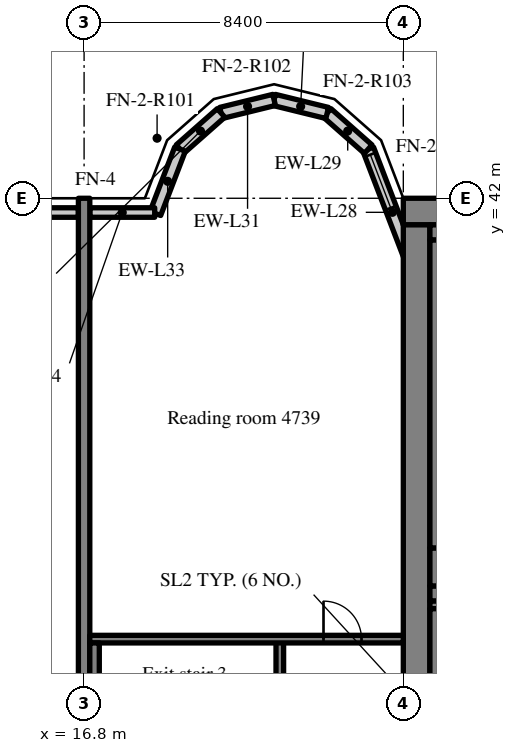
"""IFC4 building model, lengths in metres.
Left out: names, types, materials, properties, quantities, classifications, styles, units other than length and angle.
Written with IfcOpenShell. Run it as: python <this file> out.ifc"""

import sys

from ifc_helpers import new_model, si_unit, direction, frame, frame_2d, origin, place, context, subcontext, project, spatial, rectangle, extrude, source, transform, mapped, element, fill, save


model = new_model("IFC4")
c1 = context("Model", 3, precision=1e-05, world=origin(), true_north=direction((0.0, 1.0)))
c2 = subcontext(c1, "Body", "Model", "MODEL_VIEW")
j1 = project(units=[si_unit("LENGTHUNIT", "METRE"), si_unit("PLANEANGLEUNIT", "RADIAN")], contexts=[c1])
p1 = place(None, origin())
s1 = spatial("IfcSite", under=j1, at=p1, CompositionType="ELEMENT")
p2 = place(p1, origin())
s2 = spatial("IfcBuilding", under=s1, at=p2, CompositionType="ELEMENT")
p3 = place(p2, frame((0.0, 0.0, 193.4)))
s3 = spatial("IfcBuildingStorey", under=s2, at=p3, CompositionType="ELEMENT", Elevation=193.4)
m1 = source(origin(), c2, "Body", "SweptSolid", [
    extrude(rectangle(XDim=50.4, YDim=0.7, at=frame_2d((25.2, 0.0))), origin(), (0.0, 0.0, 1.0), 3.52),
])
p4 = place(p3, frame((25.2, 41.65, 0.0), z_axis=(0.0, 0.0, 1.0), x_axis=(1.0, 0.0, 0.0)))
e1 = element("IfcWall", 1, at=p4, inside=s3, PredefinedType="SHEAR", context=c2, shape_type="MappedRepresentation", body=[
    mapped(m1, transform((0.0, 0.0, 0.0), scale=1.0)),
])
m2 = source(origin(), c2, "Body", "SweptSolid", [
    extrude(rectangle(XDim=18.6, YDim=0.7, at=frame_2d((9.3, 0.0))), origin(), (0.0, 0.0, 1.0), 3.52),
])
p5 = place(p3, frame((25.55, 22.7, 0.0), z_axis=(0.0, 0.0, 1.0), x_axis=(0.0, 1.0, 0.0)))
e2 = element("IfcWall", 2, at=p5, inside=s3, PredefinedType="SHEAR", context=c2, shape_type="MappedRepresentation", body=[
    mapped(m2, transform((0.0, 0.0, 0.0), scale=1.0)),
])
m3 = source(origin(), c2, "Body", "SweptSolid", [
    extrude(rectangle(XDim=7.5, YDim=0.4, at=frame_2d((3.75, 0.0))), origin(), (0.0, 0.0, 1.0), 3.52),
])
p6 = place(p3, frame((25.9, 31.6, 0.0), z_axis=(0.0, 0.0, 1.0), x_axis=(1.0, 0.0, 0.0)))
e3 = element("IfcWall", 3, at=p6, inside=s3, PredefinedType="SHEAR", context=c2, shape_type="MappedRepresentation", body=[
    mapped(m3, transform((0.0, 0.0, 0.0), scale=1.0)),
])
m4 = source(origin(), c2, "Body", "SweptSolid", [
    extrude(rectangle(XDim=1.1, YDim=2.1, at=frame_2d((0.55, 1.05))), frame((0.0, 0.21, 0.0), z_axis=(0.0, -1.0, 0.0), x_axis=(1.0, 0.0, 0.0)), (0.0, 0.0, 1.0), 0.42),
])
p7 = place(p6, frame((5.825, 0.0, 0.0)))
e4 = element("IfcOpeningElement", 4, at=p7, cuts=e3, PredefinedType="OPENING", context=c2, shape_type="MappedRepresentation", body=[
    mapped(m4, transform((0.0, 0.0, 0.0), scale=1.0)),
])
m5 = source(origin(), c2, "Body", "SweptSolid", [
    extrude(rectangle(XDim=20.0, YDim=0.3, at=frame_2d((10.0, 0.0))), origin(), (0.0, 0.0, 1.0), 3.52),
])
p8 = place(p3, frame((16.8, 22.0, 0.0), z_axis=(0.0, 0.0, 1.0), x_axis=(0.0, 1.0, 0.0)))
e5 = element("IfcWall", 5, at=p8, inside=s3, PredefinedType="SHEAR", context=c2, shape_type="MappedRepresentation", body=[
    mapped(m5, transform((0.0, 0.0, 0.0), scale=1.0)),
])
m6 = source(origin(), c2, "Body", "SweptSolid", [
    extrude(rectangle(XDim=3.559, YDim=0.3, at=frame_2d((1.78, 0.0))), origin(), (0.0, 0.0, 1.0), 3.52),
])
p9 = place(p3, frame((25.55, 39.969, 0.0), z_axis=(0.0, 0.0, 1.0), x_axis=(-0.35779745313, 0.933799219604, 0.0)))
e6 = element("IfcWall", 6, at=p9, inside=s3, PredefinedType="SOLIDWALL", context=c2, shape_type="MappedRepresentation", body=[
    mapped(m6, transform((0.0, 0.0, 0.0), scale=1.0)),
])
m7 = source(origin(), c2, "Body", "SweptSolid", [
    extrude(rectangle(XDim=1.5, YDim=2.0, at=frame_2d((0.75, 1.0))), frame((0.0, 0.16, 0.0), z_axis=(0.0, -1.0, 0.0), x_axis=(1.0, 0.0, 0.0)), (0.0, 0.0, 1.0), 0.32),
])
p10 = place(p9, frame((1.903, 0.0, 0.9)))
e7 = element("IfcOpeningElement", 7, at=p10, cuts=e6, PredefinedType="OPENING", context=c2, shape_type="MappedRepresentation", body=[
    mapped(m7, transform((0.0, 0.0, 0.0), scale=1.0)),
])
m8 = source(origin(), c2, "Body", "SweptSolid", [
    extrude(rectangle(XDim=1.44, YDim=0.3, at=frame_2d((0.72, 0.0))), origin(), (0.0, 0.0, 1.0), 3.52),
])
p11 = place(p3, frame((24.277, 43.292, 0.0), z_axis=(0.0, 0.0, 1.0), x_axis=(-0.749649827867, 0.661834673902, 0.0)))
e8 = element("IfcWall", 8, at=p11, inside=s3, PredefinedType="SOLIDWALL", context=c2, shape_type="MappedRepresentation", body=[
    mapped(m8, transform((0.0, 0.0, 0.0), scale=1.0)),
])
m9 = source(origin(), c2, "Body", "SweptSolid", [
    extrude(rectangle(XDim=1.438, YDim=0.3, at=frame_2d((0.719, 0.0))), origin(), (0.0, 0.0, 1.0), 3.52),
])
p12 = place(p3, frame((23.197, 44.245, 0.0), z_axis=(0.0, 0.0, 1.0), x_axis=(-0.971152283879, 0.238460146601, 0.0)))
e9 = element("IfcWall", 9, at=p12, inside=s3, PredefinedType="SOLIDWALL", context=c2, shape_type="MappedRepresentation", body=[
    mapped(m9, transform((0.0, 0.0, 0.0), scale=1.0)),
])
m10 = source(origin(), c2, "Body", "SweptSolid", [
    extrude(rectangle(XDim=1.439, YDim=0.3, at=frame_2d((0.719, 0.0))), origin(), (0.0, 0.0, 1.0), 3.52),
])
p13 = place(p3, frame((21.8, 44.588, 0.0), z_axis=(0.0, 0.0, 1.0), x_axis=(-0.971161932466, -0.238420848351, 0.0)))
e10 = element("IfcWall", 10, at=p13, inside=s3, PredefinedType="SOLIDWALL", context=c2, shape_type="MappedRepresentation", body=[
    mapped(m10, transform((0.0, 0.0, 0.0), scale=1.0)),
])
m11 = source(origin(), c2, "Body", "SweptSolid", [
    extrude(rectangle(XDim=1.44, YDim=0.3, at=frame_2d((0.72, 0.0))), origin(), (0.0, 0.0, 1.0), 3.52),
])
p14 = place(p3, frame((20.403, 44.245, 0.0), z_axis=(0.0, 0.0, 1.0), x_axis=(-0.74957555648, -0.661918790432, 0.0)))
e11 = element("IfcWall", 11, at=p14, inside=s3, PredefinedType="SOLIDWALL", context=c2, shape_type="MappedRepresentation", body=[
    mapped(m11, transform((0.0, 0.0, 0.0), scale=1.0)),
])
m12 = source(origin(), c2, "Body", "SweptSolid", [
    extrude(rectangle(XDim=1.812, YDim=0.3, at=frame_2d((0.906, 0.0))), origin(), (0.0, 0.0, 1.0), 3.52),
])
p15 = place(p3, frame((19.323, 43.292, 0.0), z_axis=(0.0, 0.0, 1.0), x_axis=(-0.357877270961, -0.93376863244, 0.0)))
e12 = element("IfcWall", 12, at=p15, inside=s3, PredefinedType="SOLIDWALL", context=c2, shape_type="MappedRepresentation", body=[
    mapped(m12, transform((0.0, 0.0, 0.0), scale=1.0)),
])
m13 = source(origin(), c2, "Body", "SweptSolid", [
    extrude(rectangle(XDim=4.094, YDim=0.25, at=frame_2d((2.047, 0.0))), origin(), (0.0, 0.0, 1.0), 2.87),
])
p16 = place(p3, frame((16.65, 41.625, 0.0), z_axis=(0.0, 0.0, 1.0), x_axis=(-1.0, 0.0, 0.0)))
e13 = element("IfcWall", 13, at=p16, inside=s3, PredefinedType="SOLIDWALL", context=c2, shape_type="MappedRepresentation", body=[
    mapped(m13, transform((0.0, 0.0, 0.0), scale=1.0)),
])
m14 = source(origin(), c2, "Body", "SweptSolid", [
    extrude(rectangle(XDim=1.5, YDim=1.5, at=frame_2d((0.75, 0.75))), frame((0.0, 0.135, 0.0), z_axis=(0.0, -1.0, 0.0), x_axis=(1.0, 0.0, 0.0)), (0.0, 0.0, 1.0), 0.27),
])
p17 = place(p16, frame((1.297, 0.0, 0.9)))
e14 = element("IfcOpeningElement", 14, at=p17, cuts=e13, PredefinedType="OPENING", context=c2, shape_type="MappedRepresentation", body=[
    mapped(m14, transform((0.0, 0.0, 0.0), scale=1.0)),
])
m15 = source(origin(), c2, "Body", "SweptSolid", [
    extrude(rectangle(XDim=1.708, YDim=0.25, at=frame_2d((0.854, 0.0))), origin(), (0.0, 0.0, 1.0), 2.87),
])
p18 = place(p3, frame((18.658, 41.625, 0.0), z_axis=(0.0, 0.0, 1.0), x_axis=(-1.0, 0.0, 0.0)))
e15 = element("IfcWall", 15, at=p18, inside=s3, PredefinedType="SOLIDWALL", context=c2, shape_type="MappedRepresentation", body=[
    mapped(m15, transform((0.0, 0.0, 0.0), scale=1.0)),
])
m16 = source(origin(), c2, "Body", "SweptSolid", [
    extrude(rectangle(XDim=8.3, YDim=0.2, at=frame_2d((4.15, 0.0))), origin(), (0.0, 0.0, 1.0), 3.52),
])
p19 = place(p3, frame((21.95, 22.1, 0.0), z_axis=(0.0, 0.0, 1.0), x_axis=(0.0, 1.0, 0.0)))
e16 = element("IfcWall", 16, at=p19, inside=s3, PredefinedType="SOLIDWALL", context=c2, shape_type="MappedRepresentation", body=[
    mapped(m16, transform((0.0, 0.0, 0.0), scale=1.0)),
])
m17 = source(origin(), c2, "Body", "SweptSolid", [
    extrude(rectangle(XDim=1.2, YDim=2.1, at=frame_2d((0.6, 1.05))), frame((0.0, 0.11, 0.0), z_axis=(0.0, -1.0, 0.0), x_axis=(1.0, 0.0, 0.0)), (0.0, 0.0, 1.0), 0.22),
])
p20 = place(p19, frame((0.6, 0.0, 0.0)))
e17 = element("IfcOpeningElement", 17, at=p20, cuts=e16, PredefinedType="OPENING", context=c2, shape_type="MappedRepresentation", body=[
    mapped(m17, transform((0.0, 0.0, 0.0), scale=1.0)),
])
m18 = source(origin(), c2, "Body", "SweptSolid", [
    extrude(rectangle(XDim=8.25, YDim=0.2, at=frame_2d((4.125, 0.0))), origin(), (0.0, 0.0, 1.0), 3.52),
])
p21 = place(p3, frame((16.95, 30.4, 0.0), z_axis=(0.0, 0.0, 1.0), x_axis=(1.0, 0.0, 0.0)))
e18 = element("IfcWall", 18, at=p21, inside=s3, PredefinedType="SOLIDWALL", context=c2, shape_type="MappedRepresentation", body=[
    mapped(m18, transform((0.0, 0.0, 0.0), scale=1.0)),
])
m19 = source(origin(), c2, "Body", "SweptSolid", [
    extrude(rectangle(XDim=1.0, YDim=2.1, at=frame_2d((0.5, 1.05))), frame((0.0, 0.11, 0.0), z_axis=(0.0, -1.0, 0.0), x_axis=(1.0, 0.0, 0.0)), (0.0, 0.0, 1.0), 0.22),
])
p22 = place(p21, frame((6.15, 0.0, 0.0)))
e19 = element("IfcOpeningElement", 19, at=p22, cuts=e18, PredefinedType="OPENING", context=c2, shape_type="MappedRepresentation", body=[
    mapped(m19, transform((0.0, 0.0, 0.0), scale=1.0)),
])
m20 = source(origin(), c2, "Body", "SweptSolid", [
    extrude(rectangle(XDim=5.05, YDim=0.2, at=frame_2d((2.525, 0.0))), origin(), (0.0, 0.0, 1.0), 3.52),
])
p23 = place(p3, frame((25.9, 31.3, 0.0), z_axis=(0.0, 0.0, 1.0), x_axis=(1.0, 0.0, 0.0)))
e20 = element("IfcWall", 20, at=p23, inside=s3, PredefinedType="SOLIDWALL", context=c2, shape_type="MappedRepresentation", body=[
    mapped(m20, transform((0.0, 0.0, 0.0), scale=1.0)),
])
m21 = source(origin(), c2, "Body", "SweptSolid", [
    extrude(rectangle(XDim=8.1, YDim=0.4, at=frame_2d((4.05, 0.0))), origin(), (0.0, 0.0, 1.0), 3.52),
])
p24 = place(p3, frame((26.1, 23.1, 0.0), z_axis=(0.0, 0.0, 1.0), x_axis=(0.0, 1.0, 0.0)))
e21 = element("IfcWall", 21, at=p24, inside=s3, PredefinedType="SOLIDWALL", context=c2, shape_type="MappedRepresentation", body=[
    mapped(m21, transform((0.0, 0.0, 0.0), scale=1.0)),
])
m22 = source(origin(), c2, "Body", "SweptSolid", [
    extrude(rectangle(XDim=8.1, YDim=0.25, at=frame_2d((4.05, 0.0))), origin(), (0.0, 0.0, 1.0), 3.52),
])
p25 = place(p3, frame((17.075, 22.2, 0.0), z_axis=(0.0, 0.0, 1.0), x_axis=(0.0, 1.0, 0.0)))
e22 = element("IfcWall", 22, at=p25, inside=s3, PredefinedType="SOLIDWALL", context=c2, shape_type="MappedRepresentation", body=[
    mapped(m22, transform((0.0, 0.0, 0.0), scale=1.0)),
])
m23 = source(origin(), c2, "Body", "SweptSolid", [
    extrude(rectangle(XDim=5.05, YDim=0.4, at=frame_2d((2.525, 0.0))), origin(), (0.0, 0.0, 1.0), 3.52),
])
p26 = place(p3, frame((25.9, 41.1, 0.0), z_axis=(0.0, 0.0, 1.0), x_axis=(1.0, 0.0, 0.0)))
e23 = element("IfcWall", 23, at=p26, inside=s3, PredefinedType="SOLIDWALL", context=c2, shape_type="MappedRepresentation", body=[
    mapped(m23, transform((0.0, 0.0, 0.0), scale=1.0)),
])
m24 = source(origin(), c2, "Body", "SweptSolid", [
    extrude(rectangle(XDim=5.05, YDim=1.0, at=frame_2d((2.525, 0.0))), origin(), (0.0, 0.0, 1.0), 3.52),
])
p27 = place(p3, frame((25.9, 32.3, 0.0), z_axis=(0.0, 0.0, 1.0), x_axis=(1.0, 0.0, 0.0)))
e24 = element("IfcWall", 24, at=p27, inside=s3, PredefinedType="SOLIDWALL", context=c2, shape_type="MappedRepresentation", body=[
    mapped(m24, transform((0.0, 0.0, 0.0), scale=1.0)),
])
p28 = place(p3, frame((26.1, 32.8, 0.0), z_axis=(0.0, 0.0, 1.0), x_axis=(0.0, 1.0, 0.0)))
e25 = element("IfcWall", 25, at=p28, inside=s3, PredefinedType="SOLIDWALL", context=c2, shape_type="MappedRepresentation", body=[
    mapped(m21, transform((0.0, 0.0, 0.0), scale=1.0)),
])
m25 = source(origin(), c2, "Body", "SweptSolid", [
    extrude(rectangle(XDim=1.5, YDim=2.0, at=frame_2d((0.75, 1.0))), frame((0.0, 0.03, 0.0), z_axis=(0.0, -1.0, 0.0), x_axis=(1.0, 0.0, 0.0)), (0.0, 0.0, 1.0), 0.06),
])
p29 = place(p10, origin())
e26 = element("IfcWindow", 26, at=p29, inside=s3, PartitioningType="SINGLE_PANEL", PredefinedType="WINDOW", context=c2, shape_type="MappedRepresentation", body=[
    mapped(m25, transform((0.0, 0.0, 0.0), scale=1.0)),
])
fill(e7, e26)
m26 = source(origin(), c2, "Body", "SweptSolid", [
    extrude(rectangle(XDim=1.0, YDim=2.1, at=frame_2d((0.5, 1.05))), frame((0.0, 0.025, 0.0), z_axis=(0.0, -1.0, 0.0), x_axis=(1.0, 0.0, 0.0)), (0.0, 0.0, 1.0), 0.05),
])
p30 = place(p22, origin())
e27 = element("IfcDoor", 27, at=p30, inside=s3, OperationType="SINGLE_SWING_LEFT", PredefinedType="DOOR", context=c2, shape_type="MappedRepresentation", body=[
    mapped(m26, transform((0.0, 0.0, 0.0), scale=1.0)),
])
fill(e19, e27)
save(model, sys.argv[1])
